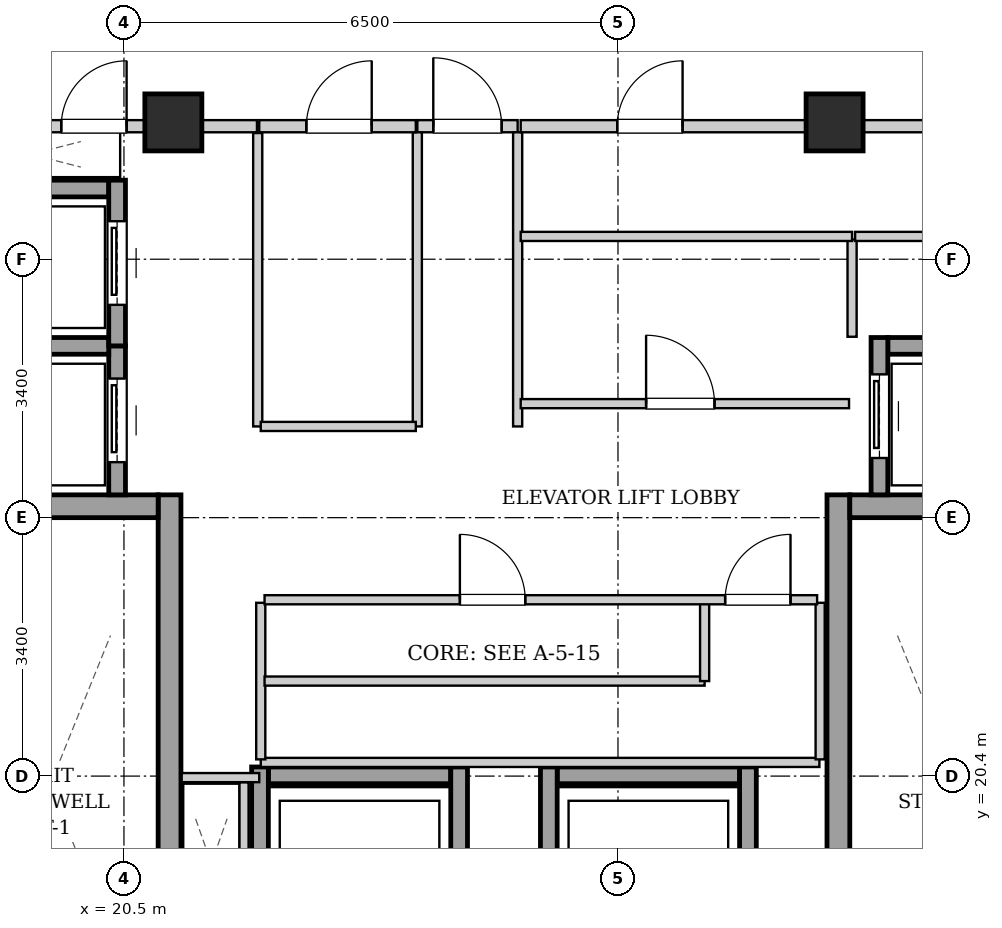
"""IFC4 building model, lengths in metres.
Left out: names, types, materials, properties, quantities, classifications, styles, units other than length and angle.
Written with IfcOpenShell. Run it as: python <this file> out.ifc"""

import sys

from ifc_helpers import new_model, si_unit, direction, frame, frame_2d, origin, origin_2d, place, context, subcontext, project, spatial, rectangle, extrude, element, fill, save


model = new_model("IFC4")
c1 = context("Model", 3, precision=1e-05, world=origin(), true_north=direction((0.0, 1.0)))
c2 = subcontext(c1, "Body", "Model", "MODEL_VIEW")
j1 = project(units=[si_unit("LENGTHUNIT", "METRE"), si_unit("PLANEANGLEUNIT", "RADIAN")], contexts=[c1])
p1 = place(None, origin())
s1 = spatial("IfcSite", under=j1, at=p1, CompositionType="ELEMENT")
p2 = place(p1, origin())
s2 = spatial("IfcBuilding", under=s1, at=p2, CompositionType="ELEMENT")
p3 = place(p2, frame((0.0, 0.0, 241.1)))
s3 = spatial("IfcBuildingStorey", under=s2, at=p3, CompositionType="ELEMENT", Elevation=241.1)
for number, where, z_axis, x_axis in (
    (1, (21.15, 29.0, 0.0), (0.0, 0.0, 1.0), (1.0, 0.0, 0.0)),
    (2, (29.85, 29.0, 0.0), (0.0, 0.0, 1.0), (1.0, 0.0, 0.0)),
):
    element("IfcColumn", number, at=place(p3, frame(where, z_axis=z_axis, x_axis=x_axis)), inside=s3, PredefinedType="COLUMN", context=c2, shape_type="SweptSolid", body=[
        extrude(rectangle(XDim=0.75, YDim=0.75, at=origin_2d()), origin(), (0.0, 0.0, 1.0), 3.4),
    ])
p4 = place(p3, frame((21.1, 15.1, 0.0), z_axis=(0.0, 0.0, 1.0), x_axis=(0.0, 1.0, 0.0)))
e3 = element("IfcWall", 3, at=p4, inside=s3, PredefinedType="SHEAR", context=c2, shape_type="SweptSolid", body=[
    extrude(rectangle(XDim=9.0, YDim=0.3, at=frame_2d((4.5, 0.0))), origin(), (0.0, 0.0, 1.0), 3.14),
])
p5 = place(p3, frame((18.1, 23.95, 0.0), z_axis=(0.0, 0.0, 1.0), x_axis=(1.0, 0.0, 0.0)))
e4 = element("IfcWall", 4, at=p5, inside=s3, PredefinedType="SHEAR", context=c2, shape_type="SweptSolid", body=[
    extrude(rectangle(XDim=2.85, YDim=0.3, at=frame_2d((1.425, 0.0))), origin(), (0.0, 0.0, 1.0), 3.14),
])
p6 = place(p3, frame((29.9, 15.1, 0.0), z_axis=(0.0, 0.0, 1.0), x_axis=(0.0, 1.0, 0.0)))
e5 = element("IfcWall", 5, at=p6, inside=s3, PredefinedType="SHEAR", context=c2, shape_type="SweptSolid", body=[
    extrude(rectangle(XDim=9.0, YDim=0.3, at=frame_2d((4.5, 0.0))), origin(), (0.0, 0.0, 1.0), 3.14),
])
p7 = place(p3, frame((30.05, 23.95, 0.0), z_axis=(0.0, 0.0, 1.0), x_axis=(1.0, 0.0, 0.0)))
e6 = element("IfcWall", 6, at=p7, inside=s3, PredefinedType="SHEAR", context=c2, shape_type="SweptSolid", body=[
    extrude(rectangle(XDim=2.85, YDim=0.3, at=frame_2d((1.425, 0.0))), origin(), (0.0, 0.0, 1.0), 3.14),
])
p8 = place(p3, frame((20.41, 24.1, 0.0), z_axis=(0.0, 0.0, 1.0), x_axis=(0.0, 1.0, 0.0)))
e7 = element("IfcWall", 7, at=p8, inside=s3, PredefinedType="SHEAR", context=c2, shape_type="SweptSolid", body=[
    extrude(rectangle(XDim=1.96, YDim=0.22, at=frame_2d((0.98, 0.0))), origin(), (0.0, 0.0, 1.0), 3.14),
])
p9 = place(p8, frame((0.43, 0.0, 0.0)))
e8 = element("IfcOpeningElement", 8, at=p9, cuts=e7, PredefinedType="OPENING", context=c2, shape_type="SweptSolid", body=[
    extrude(rectangle(XDim=1.1, YDim=2.15, at=frame_2d((0.55, 1.075))), frame((0.0, 0.12, 0.0), z_axis=(0.0, -1.0, 0.0), x_axis=(1.0, 0.0, 0.0)), (0.0, 0.0, 1.0), 0.24),
])
for number, where, z_axis, x_axis in (
    (9, (18.4, 26.06, 0.0), (0.0, 0.0, 1.0), (1.0, 0.0, 0.0)),
    (10, (18.4, 28.13, 0.0), (0.0, 0.0, 1.0), (1.0, 0.0, 0.0)),
):
    element("IfcWall", number, at=place(p3, frame(where, z_axis=z_axis, x_axis=x_axis)), inside=s3, PredefinedType="SHEAR", context=c2, shape_type="SweptSolid", body=[
        extrude(rectangle(XDim=1.9, YDim=0.22, at=frame_2d((0.95, 0.0))), origin(), (0.0, 0.0, 1.0), 3.14),
    ])
p10 = place(p3, frame((20.41, 26.06, 0.0), z_axis=(0.0, 0.0, 1.0), x_axis=(0.0, 1.0, 0.0)))
e11 = element("IfcWall", 11, at=p10, inside=s3, PredefinedType="SHEAR", context=c2, shape_type="SweptSolid", body=[
    extrude(rectangle(XDim=2.18, YDim=0.22, at=frame_2d((1.09, 0.0))), origin(), (0.0, 0.0, 1.0), 3.14),
])
p11 = place(p10, frame((0.54, 0.0, 0.0)))
e12 = element("IfcOpeningElement", 12, at=p11, cuts=e11, PredefinedType="OPENING", context=c2, shape_type="SweptSolid", body=[
    extrude(rectangle(XDim=1.1, YDim=2.15, at=frame_2d((0.55, 1.075))), frame((0.0, 0.12, 0.0), z_axis=(0.0, -1.0, 0.0), x_axis=(1.0, 0.0, 0.0)), (0.0, 0.0, 1.0), 0.24),
])
p12 = place(p3, frame((30.55, 26.06, 0.0), z_axis=(0.0, 0.0, 1.0), x_axis=(1.0, 0.0, 0.0)))
e13 = element("IfcWall", 13, at=p12, inside=s3, PredefinedType="SHEAR", context=c2, shape_type="SweptSolid", body=[
    extrude(rectangle(XDim=1.9, YDim=0.22, at=frame_2d((0.95, 0.0))), origin(), (0.0, 0.0, 1.0), 3.14),
])
p13 = place(p3, frame((30.44, 24.1, 0.0), z_axis=(0.0, 0.0, 1.0), x_axis=(0.0, 1.0, 0.0)))
e14 = element("IfcWall", 14, at=p13, inside=s3, PredefinedType="SHEAR", context=c2, shape_type="SweptSolid", body=[
    extrude(rectangle(XDim=2.07, YDim=0.22, at=frame_2d((1.035, 0.0))), origin(), (0.0, 0.0, 1.0), 3.14),
])
p14 = place(p13, frame((0.485, 0.0, 0.0)))
e15 = element("IfcOpeningElement", 15, at=p14, cuts=e14, PredefinedType="OPENING", context=c2, shape_type="SweptSolid", body=[
    extrude(rectangle(XDim=1.1, YDim=2.15, at=frame_2d((0.55, 1.075))), frame((0.0, 0.12, 0.0), z_axis=(0.0, -1.0, 0.0), x_axis=(1.0, 0.0, 0.0)), (0.0, 0.0, 1.0), 0.24),
])
p15 = place(p3, frame((22.4, 20.41, 0.0), z_axis=(0.0, 0.0, 1.0), x_axis=(1.0, 0.0, 0.0)))
e16 = element("IfcWall", 16, at=p15, inside=s3, PredefinedType="SHEAR", context=c2, shape_type="SweptSolid", body=[
    extrude(rectangle(XDim=2.4, YDim=0.22, at=frame_2d((1.2, 0.0))), origin(), (0.0, 0.0, 1.0), 3.14),
])
for number, where, z_axis, x_axis in (
    (17, (22.29, 17.98, 0.0), (0.0, 0.0, 1.0), (0.0, 1.0, 0.0)),
    (18, (24.91, 17.98, 0.0), (0.0, 0.0, 1.0), (0.0, 1.0, 0.0)),
):
    element("IfcWall", number, at=place(p3, frame(where, z_axis=z_axis, x_axis=x_axis)), inside=s3, PredefinedType="SHEAR", context=c2, shape_type="SweptSolid", body=[
        extrude(rectangle(XDim=2.54, YDim=0.22, at=frame_2d((1.27, 0.0))), origin(), (0.0, 0.0, 1.0), 3.14),
    ])
p16 = place(p3, frame((26.2, 20.41, 0.0), z_axis=(0.0, 0.0, 1.0), x_axis=(1.0, 0.0, 0.0)))
e19 = element("IfcWall", 19, at=p16, inside=s3, PredefinedType="SHEAR", context=c2, shape_type="SweptSolid", body=[
    extrude(rectangle(XDim=2.4, YDim=0.22, at=frame_2d((1.2, 0.0))), origin(), (0.0, 0.0, 1.0), 3.14),
])
for number, where, z_axis, x_axis in (
    (20, (26.09, 17.98, 0.0), (0.0, 0.0, 1.0), (0.0, 1.0, 0.0)),
    (21, (28.71, 17.98, 0.0), (0.0, 0.0, 1.0), (0.0, 1.0, 0.0)),
):
    element("IfcWall", number, at=place(p3, frame(where, z_axis=z_axis, x_axis=x_axis)), inside=s3, PredefinedType="SHEAR", context=c2, shape_type="SweptSolid", body=[
        extrude(rectangle(XDim=2.54, YDim=0.22, at=frame_2d((1.27, 0.0))), origin(), (0.0, 0.0, 1.0), 3.14),
    ])
p17 = place(p3, frame((24.36, 28.95, 0.0), z_axis=(0.0, 0.0, 1.0), x_axis=(1.0, 0.0, 0.0)))
e22 = element("IfcWall", 22, at=p17, inside=s3, PredefinedType="PARTITIONING", context=c2, shape_type="SweptSolid", body=[
    extrude(rectangle(XDim=1.32, YDim=0.16, at=frame_2d((0.66, 0.0))), origin(), (0.0, 0.0, 1.0), 2.668),
])
p18 = place(p17, frame((0.21, 0.0, 0.0)))
e23 = element("IfcOpeningElement", 23, at=p18, cuts=e22, PredefinedType="OPENING", context=c2, shape_type="SweptSolid", body=[
    extrude(rectangle(XDim=0.9, YDim=2.05, at=frame_2d((0.45, 1.025))), frame((0.0, 0.09, 0.0), z_axis=(0.0, -1.0, 0.0), x_axis=(1.0, 0.0, 0.0)), (0.0, 0.0, 1.0), 0.18),
])
p19 = place(p3, frame((17.96, 28.95, 0.0), z_axis=(0.0, 0.0, 1.0), x_axis=(1.0, 0.0, 0.0)))
e24 = element("IfcWall", 24, at=p19, inside=s3, PredefinedType="PARTITIONING", context=c2, shape_type="SweptSolid", body=[
    extrude(rectangle(XDim=4.29, YDim=0.16, at=frame_2d((2.145, 0.0))), origin(), (0.0, 0.0, 1.0), 2.668),
])
p20 = place(p19, frame((1.715, 0.0, 0.0)))
e25 = element("IfcOpeningElement", 25, at=p20, cuts=e24, PredefinedType="OPENING", context=c2, shape_type="SweptSolid", body=[
    extrude(rectangle(XDim=0.86, YDim=2.05, at=frame_2d((0.43, 1.025))), frame((0.0, 0.09, 0.0), z_axis=(0.0, -1.0, 0.0), x_axis=(1.0, 0.0, 0.0)), (0.0, 0.0, 1.0), 0.18),
])
p21 = place(p3, frame((22.08, 18.2, 0.0), z_axis=(0.0, 0.0, 1.0), x_axis=(0.0, 1.0, 0.0)))
e26 = element("IfcWall", 26, at=p21, inside=s3, PredefinedType="PARTITIONING", context=c2, shape_type="SweptSolid", body=[
    extrude(rectangle(XDim=2.12, YDim=0.12, at=frame_2d((1.06, 0.0))), origin(), (0.0, 0.0, 1.0), 3.14),
])
p22 = place(p3, frame((22.28, 20.38, 0.0), z_axis=(0.0, 0.0, 1.0), x_axis=(-1.0, 0.0, 0.0)))
e27 = element("IfcWall", 27, at=p22, inside=s3, PredefinedType="PARTITIONING", context=c2, shape_type="SweptSolid", body=[
    extrude(rectangle(XDim=1.02, YDim=0.12, at=frame_2d((0.51, 0.0))), origin(), (0.0, 0.0, 1.0), 3.14),
])
for number, where, z_axis, x_axis in (
    (28, (24.36, 25.0, 0.0), (0.0, 0.0, 1.0), (0.0, 1.0, 0.0)),
    (29, (25.68, 25.0, 0.0), (0.0, 0.0, 1.0), (0.0, 1.0, 0.0)),
):
    element("IfcWall", number, at=place(p3, frame(where, z_axis=z_axis, x_axis=x_axis)), inside=s3, PredefinedType="PARTITIONING", context=c2, shape_type="SweptSolid", body=[
        extrude(rectangle(XDim=3.87, YDim=0.12, at=frame_2d((1.935, 0.0))), origin(), (0.0, 0.0, 1.0), 3.14),
    ])
p23 = place(p3, frame((30.08, 26.18, 0.0), z_axis=(0.0, 0.0, 1.0), x_axis=(0.0, 1.0, 0.0)))
e30 = element("IfcWall", 30, at=p23, inside=s3, PredefinedType="PARTITIONING", context=c2, shape_type="SweptSolid", body=[
    extrude(rectangle(XDim=1.28, YDim=0.12, at=frame_2d((0.64, 0.0))), origin(), (0.0, 0.0, 1.0), 3.14),
])
p24 = place(p3, frame((30.12, 27.5, 0.0), z_axis=(0.0, 0.0, 1.0), x_axis=(1.0, 0.0, 0.0)))
e31 = element("IfcWall", 31, at=p24, inside=s3, PredefinedType="PARTITIONING", context=c2, shape_type="SweptSolid", body=[
    extrude(rectangle(XDim=2.92, YDim=0.12, at=frame_2d((1.46, 0.0))), origin(), (0.0, 0.0, 1.0), 3.14),
])
p25 = place(p24, frame((0.97, 0.0, 0.0)))
e32 = element("IfcOpeningElement", 32, at=p25, cuts=e31, PredefinedType="OPENING", context=c2, shape_type="SweptSolid", body=[
    extrude(rectangle(XDim=0.86, YDim=2.05, at=frame_2d((0.43, 1.025))), frame((0.0, 0.07, 0.0), z_axis=(0.0, -1.0, 0.0), x_axis=(1.0, 0.0, 0.0)), (0.0, 0.0, 1.0), 0.14),
])
p26 = place(p3, frame((22.26, 25.0, 0.0), z_axis=(0.0, 0.0, 1.0), x_axis=(0.0, 1.0, 0.0)))
e33 = element("IfcWall", 33, at=p26, inside=s3, PredefinedType="PARTITIONING", context=c2, shape_type="SweptSolid", body=[
    extrude(rectangle(XDim=3.86, YDim=0.12, at=frame_2d((1.93, 0.0))), origin(), (0.0, 0.0, 1.0), 3.14),
])
p27 = place(p3, frame((22.3, 25.0, 0.0), z_axis=(0.0, 0.0, 1.0), x_axis=(1.0, 0.0, 0.0)))
e34 = element("IfcWall", 34, at=p27, inside=s3, PredefinedType="PARTITIONING", context=c2, shape_type="SweptSolid", body=[
    extrude(rectangle(XDim=2.04, YDim=0.12, at=frame_2d((1.02, 0.0))), origin(), (0.0, 0.0, 1.0), 3.14),
])
p28 = place(p3, frame((22.28, 28.95, 0.0), z_axis=(0.0, 0.0, 1.0), x_axis=(1.0, 0.0, 0.0)))
e35 = element("IfcWall", 35, at=p28, inside=s3, PredefinedType="PARTITIONING", context=c2, shape_type="SweptSolid", body=[
    extrude(rectangle(XDim=2.06, YDim=0.16, at=frame_2d((1.03, 0.0))), origin(), (0.0, 0.0, 1.0), 2.668),
])
p29 = place(p28, frame((0.62, 0.0, 0.0)))
e36 = element("IfcOpeningElement", 36, at=p29, cuts=e35, PredefinedType="OPENING", context=c2, shape_type="SweptSolid", body=[
    extrude(rectangle(XDim=0.86, YDim=2.05, at=frame_2d((0.43, 1.025))), frame((0.0, 0.09, 0.0), z_axis=(0.0, -1.0, 0.0), x_axis=(1.0, 0.0, 0.0)), (0.0, 0.0, 1.0), 0.18),
])
p30 = place(p3, frame((25.72, 27.5, 0.0), z_axis=(0.0, 0.0, 1.0), x_axis=(1.0, 0.0, 0.0)))
e37 = element("IfcWall", 37, at=p30, inside=s3, PredefinedType="PARTITIONING", context=c2, shape_type="SweptSolid", body=[
    extrude(rectangle(XDim=4.36, YDim=0.12, at=frame_2d((2.18, 0.0))), origin(), (0.0, 0.0, 1.0), 3.14),
])
p31 = place(p3, frame((25.72, 25.3, 0.0), z_axis=(0.0, 0.0, 1.0), x_axis=(1.0, 0.0, 0.0)))
e38 = element("IfcWall", 38, at=p31, inside=s3, PredefinedType="PARTITIONING", context=c2, shape_type="SweptSolid", body=[
    extrude(rectangle(XDim=4.32, YDim=0.12, at=frame_2d((2.16, 0.0))), origin(), (0.0, 0.0, 1.0), 3.14),
])
p32 = place(p31, frame((1.65, 0.0, 0.0)))
e39 = element("IfcOpeningElement", 39, at=p32, cuts=e38, PredefinedType="OPENING", context=c2, shape_type="SweptSolid", body=[
    extrude(rectangle(XDim=0.9, YDim=2.05, at=frame_2d((0.45, 1.025))), frame((0.0, 0.07, 0.0), z_axis=(0.0, -1.0, 0.0), x_axis=(1.0, 0.0, 0.0)), (0.0, 0.0, 1.0), 0.14),
])
p33 = place(p3, frame((25.72, 28.95, 0.0), z_axis=(0.0, 0.0, 1.0), x_axis=(1.0, 0.0, 0.0)))
e40 = element("IfcWall", 40, at=p33, inside=s3, PredefinedType="PARTITIONING", context=c2, shape_type="SweptSolid", body=[
    extrude(rectangle(XDim=7.32, YDim=0.16, at=frame_2d((3.66, 0.0))), origin(), (0.0, 0.0, 1.0), 2.668),
])
p34 = place(p33, frame((1.27, 0.0, 0.0)))
e41 = element("IfcOpeningElement", 41, at=p34, cuts=e40, PredefinedType="OPENING", context=c2, shape_type="SweptSolid", body=[
    extrude(rectangle(XDim=0.86, YDim=2.05, at=frame_2d((0.43, 1.025))), frame((0.0, 0.09, 0.0), z_axis=(0.0, -1.0, 0.0), x_axis=(1.0, 0.0, 0.0)), (0.0, 0.0, 1.0), 0.18),
])
p35 = place(p3, frame((22.3, 20.58, 0.0), z_axis=(0.0, 0.0, 1.0), x_axis=(1.0, 0.0, 0.0)))
e42 = element("IfcWall", 42, at=p35, inside=s3, PredefinedType="PARTITIONING", context=c2, shape_type="SweptSolid", body=[
    extrude(rectangle(XDim=7.35, YDim=0.12, at=frame_2d((3.675, 0.0))), origin(), (0.0, 0.0, 1.0), 3.14),
])
for number, where, z_axis, x_axis in (
    (43, (22.3, 20.62, 0.0), (0.0, 0.0, 1.0), (0.0, 1.0, 0.0)),
    (44, (29.66, 20.62, 0.0), (0.0, 0.0, 1.0), (0.0, 1.0, 0.0)),
):
    element("IfcWall", number, at=place(p3, frame(where, z_axis=z_axis, x_axis=x_axis)), inside=s3, PredefinedType="PARTITIONING", context=c2, shape_type="SweptSolid", body=[
        extrude(rectangle(XDim=2.06, YDim=0.12, at=frame_2d((1.03, 0.0))), origin(), (0.0, 0.0, 1.0), 3.14),
    ])
p36 = place(p3, frame((22.35, 21.65, 0.0), z_axis=(0.0, 0.0, 1.0), x_axis=(1.0, 0.0, 0.0)))
e45 = element("IfcWall", 45, at=p36, inside=s3, PredefinedType="PARTITIONING", context=c2, shape_type="SweptSolid", body=[
    extrude(rectangle(XDim=5.79, YDim=0.12, at=frame_2d((2.895, 0.0))), origin(), (0.0, 0.0, 1.0), 3.14),
])
p37 = place(p3, frame((28.14, 21.65, 0.0), z_axis=(0.0, 0.0, 1.0), x_axis=(0.0, 1.0, 0.0)))
e46 = element("IfcWall", 46, at=p37, inside=s3, PredefinedType="PARTITIONING", context=c2, shape_type="SweptSolid", body=[
    extrude(rectangle(XDim=1.03, YDim=0.12, at=frame_2d((0.515, 0.0))), origin(), (0.0, 0.0, 1.0), 3.14),
])
p38 = place(p3, frame((22.35, 22.72, 0.0), z_axis=(0.0, 0.0, 1.0), x_axis=(1.0, 0.0, 0.0)))
e47 = element("IfcWall", 47, at=p38, inside=s3, PredefinedType="PARTITIONING", context=c2, shape_type="SweptSolid", body=[
    extrude(rectangle(XDim=7.27, YDim=0.12, at=frame_2d((3.635, 0.0))), origin(), (0.0, 0.0, 1.0), 3.14),
])
p39 = place(p38, frame((2.57, 0.0, 0.0)))
e48 = element("IfcOpeningElement", 48, at=p39, cuts=e47, PredefinedType="OPENING", context=c2, shape_type="SweptSolid", body=[
    extrude(rectangle(XDim=0.86, YDim=2.05, at=frame_2d((0.43, 1.025))), frame((0.0, 0.07, 0.0), z_axis=(0.0, -1.0, 0.0), x_axis=(1.0, 0.0, 0.0)), (0.0, 0.0, 1.0), 0.14),
])
p40 = place(p38, frame((6.06, 0.0, 0.0)))
e49 = element("IfcOpeningElement", 49, at=p40, cuts=e47, PredefinedType="OPENING", context=c2, shape_type="SweptSolid", body=[
    extrude(rectangle(XDim=0.86, YDim=2.05, at=frame_2d((0.43, 1.025))), frame((0.0, 0.07, 0.0), z_axis=(0.0, -1.0, 0.0), x_axis=(1.0, 0.0, 0.0)), (0.0, 0.0, 1.0), 0.14),
])
p41 = place(p9, origin())
e50 = element("IfcDoor", 50, at=p41, inside=s3, OperationType="SLIDING_TO_LEFT", PredefinedType="DOOR", context=c2, shape_type="SweptSolid", body=[
    extrude(rectangle(XDim=1.1, YDim=2.15, at=frame_2d((0.55, 1.075))), frame((0.0, 0.025, 0.0), z_axis=(0.0, -1.0, 0.0), x_axis=(1.0, 0.0, 0.0)), (0.0, 0.0, 1.0), 0.05),
])
fill(e8, e50)
p42 = place(p11, origin())
e51 = element("IfcDoor", 51, at=p42, inside=s3, OperationType="SLIDING_TO_LEFT", PredefinedType="DOOR", context=c2, shape_type="SweptSolid", body=[
    extrude(rectangle(XDim=1.1, YDim=2.15, at=frame_2d((0.55, 1.075))), frame((0.0, 0.025, 0.0), z_axis=(0.0, -1.0, 0.0), x_axis=(1.0, 0.0, 0.0)), (0.0, 0.0, 1.0), 0.05),
])
fill(e12, e51)
p43 = place(p14, origin())
e52 = element("IfcDoor", 52, at=p43, inside=s3, OperationType="SLIDING_TO_LEFT", PredefinedType="DOOR", context=c2, shape_type="SweptSolid", body=[
    extrude(rectangle(XDim=1.1, YDim=2.15, at=frame_2d((0.55, 1.075))), frame((0.0, 0.025, 0.0), z_axis=(0.0, -1.0, 0.0), x_axis=(1.0, 0.0, 0.0)), (0.0, 0.0, 1.0), 0.05),
])
fill(e15, e52)
p44 = place(p18, origin())
e53 = element("IfcDoor", 53, at=p44, inside=s3, OperationType="SINGLE_SWING_LEFT", PredefinedType="DOOR", context=c2, shape_type="SweptSolid", body=[
    extrude(rectangle(XDim=0.9, YDim=2.05, at=frame_2d((0.45, 1.025))), frame((0.0, 0.025, 0.0), z_axis=(0.0, -1.0, 0.0), x_axis=(1.0, 0.0, 0.0)), (0.0, 0.0, 1.0), 0.05),
])
fill(e23, e53)
p45 = place(p20, origin())
e54 = element("IfcDoor", 54, at=p45, inside=s3, OperationType="SINGLE_SWING_RIGHT", PredefinedType="DOOR", context=c2, shape_type="SweptSolid", body=[
    extrude(rectangle(XDim=0.86, YDim=2.05, at=frame_2d((0.43, 1.025))), frame((0.0, 0.025, 0.0), z_axis=(0.0, -1.0, 0.0), x_axis=(1.0, 0.0, 0.0)), (0.0, 0.0, 1.0), 0.05),
])
fill(e25, e54)
p46 = place(p29, origin())
e55 = element("IfcDoor", 55, at=p46, inside=s3, OperationType="SINGLE_SWING_RIGHT", PredefinedType="DOOR", context=c2, shape_type="SweptSolid", body=[
    extrude(rectangle(XDim=0.86, YDim=2.05, at=frame_2d((0.43, 1.025))), frame((0.0, 0.025, 0.0), z_axis=(0.0, -1.0, 0.0), x_axis=(1.0, 0.0, 0.0)), (0.0, 0.0, 1.0), 0.05),
])
fill(e36, e55)
p47 = place(p32, origin())
e56 = element("IfcDoor", 56, at=p47, inside=s3, OperationType="SINGLE_SWING_LEFT", PredefinedType="DOOR", context=c2, shape_type="SweptSolid", body=[
    extrude(rectangle(XDim=0.9, YDim=2.05, at=frame_2d((0.45, 1.025))), frame((0.0, 0.025, 0.0), z_axis=(0.0, -1.0, 0.0), x_axis=(1.0, 0.0, 0.0)), (0.0, 0.0, 1.0), 0.05),
])
fill(e39, e56)
p48 = place(p34, origin())
e57 = element("IfcDoor", 57, at=p48, inside=s3, OperationType="SINGLE_SWING_RIGHT", PredefinedType="DOOR", context=c2, shape_type="SweptSolid", body=[
    extrude(rectangle(XDim=0.86, YDim=2.05, at=frame_2d((0.43, 1.025))), frame((0.0, 0.025, 0.0), z_axis=(0.0, -1.0, 0.0), x_axis=(1.0, 0.0, 0.0)), (0.0, 0.0, 1.0), 0.05),
])
fill(e41, e57)
p49 = place(p39, origin())
e58 = element("IfcDoor", 58, at=p49, inside=s3, OperationType="SINGLE_SWING_LEFT", PredefinedType="DOOR", context=c2, shape_type="SweptSolid", body=[
    extrude(rectangle(XDim=0.86, YDim=2.05, at=frame_2d((0.43, 1.025))), frame((0.0, 0.025, 0.0), z_axis=(0.0, -1.0, 0.0), x_axis=(1.0, 0.0, 0.0)), (0.0, 0.0, 1.0), 0.05),
])
fill(e48, e58)
p50 = place(p40, origin())
e59 = element("IfcDoor", 59, at=p50, inside=s3, OperationType="SINGLE_SWING_RIGHT", PredefinedType="DOOR", context=c2, shape_type="SweptSolid", body=[
    extrude(rectangle(XDim=0.86, YDim=2.05, at=frame_2d((0.43, 1.025))), frame((0.0, 0.025, 0.0), z_axis=(0.0, -1.0, 0.0), x_axis=(1.0, 0.0, 0.0)), (0.0, 0.0, 1.0), 0.05),
])
fill(e49, e59)
save(model, sys.argv[1])
